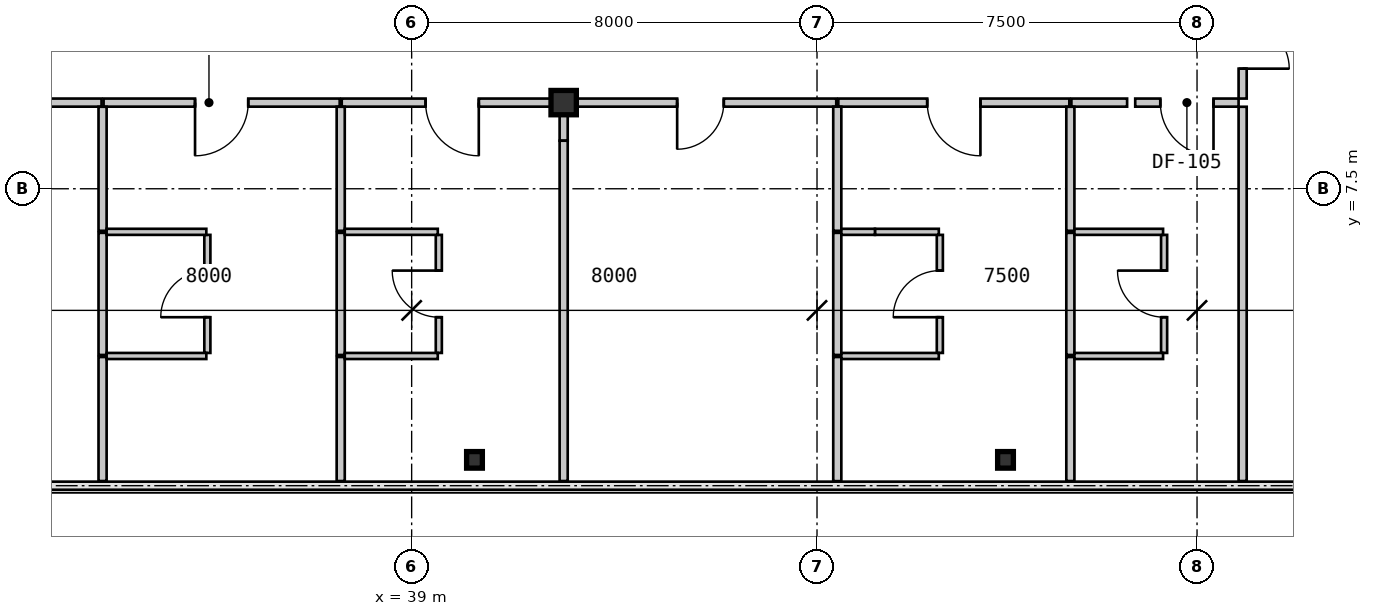
"""IFC4 building model, lengths in metres.
Left out: names, types, materials, properties, quantities, classifications, styles, units other than length and angle.
Written with IfcOpenShell. Run it as: python <this file> out.ifc"""

import sys

from ifc_helpers import new_model, si_unit, direction, frame, frame_2d, origin, origin_2d, place, context, subcontext, project, spatial, rectangle, i_section, extrude, source, transform, mapped, element, fill, save


model = new_model("IFC4")
c1 = context("Model", 3, precision=1e-05, world=origin(), true_north=direction((0.0, 1.0)))
c2 = subcontext(c1, "Body", "Model", "MODEL_VIEW")
j1 = project(units=[si_unit("LENGTHUNIT", "METRE"), si_unit("PLANEANGLEUNIT", "RADIAN")], contexts=[c1])
p1 = place(None, origin())
s1 = spatial("IfcSite", under=j1, at=p1, CompositionType="ELEMENT")
p2 = place(p1, origin())
s2 = spatial("IfcBuilding", under=s1, at=p2, CompositionType="ELEMENT")
p3 = place(p2, frame((0.0, 0.0, 19.95)))
s3 = spatial("IfcBuildingStorey", under=s2, at=p3, CompositionType="ELEMENT", Elevation=19.95)
m1 = source(origin(), c2, "Body", "SweptSolid", [
    extrude(i_section(OverallWidth=0.5, OverallDepth=0.48, WebThickness=0.028, FlangeThickness=0.044, at=origin_2d()), origin(), (0.0, 0.0, 1.0), 3.15),
])
p4 = place(p3, frame((42.0, 9.2, 0.0), z_axis=(0.0, 0.0, 1.0), x_axis=(1.0, 0.0, 0.0)))
e1 = element("IfcColumn", 1, at=p4, inside=s3, PredefinedType="COLUMN", context=c2, shape_type="MappedRepresentation", body=[
    mapped(m1, transform((0.0, 0.0, 0.0), scale=1.0)),
])
m2 = source(origin(), c2, "Body", "SweptSolid", [
    extrude(i_section(OverallWidth=0.311, OverallDepth=0.327, WebThickness=0.016, FlangeThickness=0.025, at=origin_2d()), origin(), (0.0, 0.0, 1.0), 3.15),
])
for number, where, z_axis, x_axis in (
    (2, (40.24, 2.15, 0.0), (0.0, 0.0, 1.0), (1.0, 0.0, 0.0)),
    (3, (50.72, 2.15, 0.0), (0.0, 0.0, 1.0), (1.0, 0.0, 0.0)),
):
    element("IfcColumn", number, at=place(p3, frame(where, z_axis=z_axis, x_axis=x_axis)), inside=s3, PredefinedType="COLUMN", context=c2, shape_type="MappedRepresentation", body=[
        mapped(m2, transform((0.0, 0.0, 0.0), scale=1.0)),
    ])
m3 = source(origin(), c2, "Body", "SweptSolid", [
    extrude(rectangle(XDim=2.04, YDim=0.16, at=frame_2d((1.02, 0.0))), origin(), (0.0, 0.0, 1.0), 2.93),
])
p5 = place(p3, frame((55.32, 9.2, 0.0), z_axis=(0.0, 0.0, 1.0), x_axis=(-1.0, 0.0, 0.0)))
e4 = element("IfcWall", 4, at=p5, inside=s3, PredefinedType="PARTITIONING", context=c2, shape_type="MappedRepresentation", body=[
    mapped(m3, transform((0.0, 0.0, 0.0), scale=1.0)),
])
m4 = source(origin(), c2, "Body", "SweptSolid", [
    extrude(rectangle(XDim=1.05, YDim=2.1, at=frame_2d((0.525, 1.05))), frame((0.0, 0.09, 0.0), z_axis=(0.0, -1.0, 0.0), x_axis=(1.0, 0.0, 0.0)), (0.0, 0.0, 1.0), 0.18),
])
p6 = place(p5, frame((0.495, 0.0, 0.0)))
e5 = element("IfcOpeningElement", 5, at=p6, cuts=e4, PredefinedType="OPENING", context=c2, shape_type="MappedRepresentation", body=[
    mapped(m4, transform((0.0, 0.0, 0.0), scale=1.0)),
])
m5 = source(origin(), c2, "Body", "SweptSolid", [
    extrude(rectangle(XDim=2.1, YDim=0.16, at=frame_2d((1.05, 0.0))), origin(), (0.0, 0.0, 1.0), 2.93),
])
p7 = place(p3, frame((55.4, 11.38, 0.0), z_axis=(0.0, 0.0, 1.0), x_axis=(0.0, -1.0, 0.0)))
e6 = element("IfcWall", 6, at=p7, inside=s3, PredefinedType="PARTITIONING", context=c2, shape_type="MappedRepresentation", body=[
    mapped(m5, transform((0.0, 0.0, 0.0), scale=1.0)),
])
m6 = source(origin(), c2, "Body", "SweptSolid", [
    extrude(rectangle(XDim=0.92, YDim=2.1, at=frame_2d((0.46, 1.05))), frame((0.0, 0.09, 0.0), z_axis=(0.0, -1.0, 0.0), x_axis=(1.0, 0.0, 0.0)), (0.0, 0.0, 1.0), 0.18),
])
p8 = place(p7, frame((0.59, 0.0, 0.0)))
e7 = element("IfcOpeningElement", 7, at=p8, cuts=e6, PredefinedType="OPENING", context=c2, shape_type="MappedRepresentation", body=[
    mapped(m6, transform((0.0, 0.0, 0.0), scale=1.0)),
])
m7 = source(origin(), c2, "Body", "SweptSolid", [
    extrude(rectangle(XDim=4.859, YDim=0.16, at=frame_2d((2.43, 0.0))), origin(), (0.0, 0.0, 1.0), 2.328),
])
p9 = place(p3, frame((32.88, 9.2, 0.0), z_axis=(0.0, 0.0, 1.0), x_axis=(-1.0, 0.0, 0.0)))
e8 = element("IfcWall", 8, at=p9, inside=s3, PredefinedType="PARTITIONING", context=c2, shape_type="MappedRepresentation", body=[
    mapped(m7, transform((0.0, 0.0, 0.0), scale=1.0)),
])
p10 = place(p9, frame((1.905, 0.0, 0.0)))
e9 = element("IfcOpeningElement", 9, at=p10, cuts=e8, PredefinedType="OPENING", context=c2, shape_type="MappedRepresentation", body=[
    mapped(m4, transform((0.0, 0.0, 0.0), scale=1.0)),
])
m8 = source(origin(), c2, "Body", "SweptSolid", [
    extrude(rectangle(XDim=4.659, YDim=0.16, at=frame_2d((2.33, 0.0))), origin(), (0.0, 0.0, 1.0), 2.328),
])
p11 = place(p3, frame((37.58, 9.2, 0.0), z_axis=(0.0, 0.0, 1.0), x_axis=(-1.0, 0.0, 0.0)))
e10 = element("IfcWall", 10, at=p11, inside=s3, PredefinedType="PARTITIONING", context=c2, shape_type="MappedRepresentation", body=[
    mapped(m8, transform((0.0, 0.0, 0.0), scale=1.0)),
])
p12 = place(p11, frame((1.805, 0.0, 0.0)))
e11 = element("IfcOpeningElement", 11, at=p12, cuts=e10, PredefinedType="OPENING", context=c2, shape_type="MappedRepresentation", body=[
    mapped(m4, transform((0.0, 0.0, 0.0), scale=1.0)),
])
m9 = source(origin(), c2, "Body", "SweptSolid", [
    extrude(rectangle(XDim=4.359, YDim=0.16, at=frame_2d((2.18, 0.0))), origin(), (0.0, 0.0, 1.0), 2.328),
])
p13 = place(p3, frame((41.98, 9.2, 0.0), z_axis=(0.0, 0.0, 1.0), x_axis=(-1.0, 0.0, 0.0)))
e12 = element("IfcWall", 12, at=p13, inside=s3, PredefinedType="PARTITIONING", context=c2, shape_type="MappedRepresentation", body=[
    mapped(m9, transform((0.0, 0.0, 0.0), scale=1.0)),
])
p14 = place(p13, frame((1.655, 0.0, 0.0)))
e13 = element("IfcOpeningElement", 13, at=p14, cuts=e12, PredefinedType="OPENING", context=c2, shape_type="MappedRepresentation", body=[
    mapped(m4, transform((0.0, 0.0, 0.0), scale=1.0)),
])
m10 = source(origin(), c2, "Body", "SweptSolid", [
    extrude(rectangle(XDim=5.36, YDim=0.16, at=frame_2d((2.68, 0.0))), origin(), (0.0, 0.0, 1.0), 2.93),
])
p15 = place(p3, frame((47.38, 9.2, 0.0), z_axis=(0.0, 0.0, 1.0), x_axis=(-1.0, 0.0, 0.0)))
e14 = element("IfcWall", 14, at=p15, inside=s3, PredefinedType="PARTITIONING", context=c2, shape_type="MappedRepresentation", body=[
    mapped(m10, transform((0.0, 0.0, 0.0), scale=1.0)),
])
p16 = place(p15, frame((2.22, 0.0, 0.0)))
e15 = element("IfcOpeningElement", 15, at=p16, cuts=e14, PredefinedType="OPENING", context=c2, shape_type="MappedRepresentation", body=[
    mapped(m6, transform((0.0, 0.0, 0.0), scale=1.0)),
])
m11 = source(origin(), c2, "Body", "SweptSolid", [
    extrude(rectangle(XDim=4.559, YDim=0.16, at=frame_2d((2.28, 0.0))), origin(), (0.0, 0.0, 1.0), 2.93),
])
p17 = place(p3, frame((51.98, 9.2, 0.0), z_axis=(0.0, 0.0, 1.0), x_axis=(-1.0, 0.0, 0.0)))
e16 = element("IfcWall", 16, at=p17, inside=s3, PredefinedType="PARTITIONING", context=c2, shape_type="MappedRepresentation", body=[
    mapped(m11, transform((0.0, 0.0, 0.0), scale=1.0)),
])
p18 = place(p17, frame((1.755, 0.0, 0.0)))
e17 = element("IfcOpeningElement", 17, at=p18, cuts=e16, PredefinedType="OPENING", context=c2, shape_type="MappedRepresentation", body=[
    mapped(m4, transform((0.0, 0.0, 0.0), scale=1.0)),
])
m12 = source(origin(), c2, "Body", "SweptSolid", [
    extrude(rectangle(XDim=1.1, YDim=0.16, at=frame_2d((0.55, 0.0))), origin(), (0.0, 0.0, 1.0), 2.93),
])
p19 = place(p3, frame((53.12, 9.2, 0.0), z_axis=(0.0, 0.0, 1.0), x_axis=(-1.0, 0.0, 0.0)))
e18 = element("IfcWall", 18, at=p19, inside=s3, PredefinedType="PARTITIONING", context=c2, shape_type="MappedRepresentation", body=[
    mapped(m12, transform((0.0, 0.0, 0.0), scale=1.0)),
])
m13 = source(origin(), c2, "Body", "SweptSolid", [
    extrude(rectangle(XDim=2.448, YDim=0.16, at=frame_2d((1.224, 0.0))), origin(), (0.0, 0.0, 1.0), 2.93),
])
for number, where, z_axis, x_axis in (
    (19, (32.9, 4.18, 0.0), (0.0, 0.0, 1.0), (0.0, -1.0, 0.0)),
    (20, (32.9, 9.118, 0.0), (0.0, 0.0, 1.0), (0.0, -1.0, 0.0)),
):
    element("IfcWall", number, at=place(p3, frame(where, z_axis=z_axis, x_axis=x_axis)), inside=s3, PredefinedType="PARTITIONING", context=c2, shape_type="MappedRepresentation", body=[
        mapped(m13, transform((0.0, 0.0, 0.0), scale=1.0)),
    ])
m14 = source(origin(), c2, "Body", "SweptSolid", [
    extrude(rectangle(XDim=2.41, YDim=0.16, at=frame_2d((1.205, 0.0))), origin(), (0.0, 0.0, 1.0), 2.93),
])
p20 = place(p3, frame((32.9, 6.63, 0.0), z_axis=(0.0, 0.0, 1.0), x_axis=(0.0, -1.0, 0.0)))
e21 = element("IfcWall", 21, at=p20, inside=s3, PredefinedType="PARTITIONING", context=c2, shape_type="MappedRepresentation", body=[
    mapped(m14, transform((0.0, 0.0, 0.0), scale=1.0)),
])
m15 = source(origin(), c2, "Body", "SweptSolid", [
    extrude(rectangle(XDim=2.33, YDim=0.12, at=frame_2d((1.165, 0.0))), origin(), (0.0, 0.0, 1.0), 2.93),
])
p21 = place(p3, frame((34.968, 4.26, 0.0), z_axis=(0.0, 0.0, 1.0), x_axis=(0.0, 1.0, 0.0)))
e22 = element("IfcWall", 22, at=p21, inside=s3, PredefinedType="PARTITIONING", context=c2, shape_type="MappedRepresentation", body=[
    mapped(m15, transform((0.0, 0.0, 0.0), scale=1.0)),
])
m16 = source(origin(), c2, "Body", "SweptSolid", [
    extrude(rectangle(XDim=0.92, YDim=2.1, at=frame_2d((0.46, 1.05))), frame((0.0, 0.07, 0.0), z_axis=(0.0, -1.0, 0.0), x_axis=(1.0, 0.0, 0.0)), (0.0, 0.0, 1.0), 0.14),
])
p22 = place(p21, frame((0.705, 0.0, 0.0)))
e23 = element("IfcOpeningElement", 23, at=p22, cuts=e22, PredefinedType="OPENING", context=c2, shape_type="MappedRepresentation", body=[
    mapped(m16, transform((0.0, 0.0, 0.0), scale=1.0)),
])
m17 = source(origin(), c2, "Body", "SweptSolid", [
    extrude(rectangle(XDim=1.968, YDim=0.12, at=frame_2d((0.984, 0.0))), origin(), (0.0, 0.0, 1.0), 2.93),
])
for number, where, z_axis, x_axis in (
    (24, (32.98, 4.2, 0.0), (0.0, 0.0, 1.0), (1.0, 0.0, 0.0)),
    (25, (34.948, 6.65, 0.0), (0.0, 0.0, 1.0), (-1.0, 0.0, 0.0)),
):
    element("IfcWall", number, at=place(p3, frame(where, z_axis=z_axis, x_axis=x_axis)), inside=s3, PredefinedType="PARTITIONING", context=c2, shape_type="MappedRepresentation", body=[
        mapped(m17, transform((0.0, 0.0, 0.0), scale=1.0)),
    ])
for number, where, z_axis, x_axis in (
    (26, (37.6, 4.18, 0.0), (0.0, 0.0, 1.0), (0.0, -1.0, 0.0)),
    (27, (37.6, 9.118, 0.0), (0.0, 0.0, 1.0), (0.0, -1.0, 0.0)),
):
    element("IfcWall", number, at=place(p3, frame(where, z_axis=z_axis, x_axis=x_axis)), inside=s3, PredefinedType="PARTITIONING", context=c2, shape_type="MappedRepresentation", body=[
        mapped(m13, transform((0.0, 0.0, 0.0), scale=1.0)),
    ])
p23 = place(p3, frame((37.6, 6.63, 0.0), z_axis=(0.0, 0.0, 1.0), x_axis=(0.0, -1.0, 0.0)))
e28 = element("IfcWall", 28, at=p23, inside=s3, PredefinedType="PARTITIONING", context=c2, shape_type="MappedRepresentation", body=[
    mapped(m14, transform((0.0, 0.0, 0.0), scale=1.0)),
])
p24 = place(p3, frame((39.536, 4.26, 0.0), z_axis=(0.0, 0.0, 1.0), x_axis=(0.0, 1.0, 0.0)))
e29 = element("IfcWall", 29, at=p24, inside=s3, PredefinedType="PARTITIONING", context=c2, shape_type="MappedRepresentation", body=[
    mapped(m15, transform((0.0, 0.0, 0.0), scale=1.0)),
])
p25 = place(p24, frame((0.705, 0.0, 0.0)))
e30 = element("IfcOpeningElement", 30, at=p25, cuts=e29, PredefinedType="OPENING", context=c2, shape_type="MappedRepresentation", body=[
    mapped(m16, transform((0.0, 0.0, 0.0), scale=1.0)),
])
m18 = source(origin(), c2, "Body", "SweptSolid", [
    extrude(rectangle(XDim=1.836, YDim=0.12, at=frame_2d((0.918, 0.0))), origin(), (0.0, 0.0, 1.0), 2.93),
])
for number, where, z_axis, x_axis in (
    (31, (37.68, 4.2, 0.0), (0.0, 0.0, 1.0), (1.0, 0.0, 0.0)),
    (32, (39.516, 6.65, 0.0), (0.0, 0.0, 1.0), (-1.0, 0.0, 0.0)),
):
    element("IfcWall", number, at=place(p3, frame(where, z_axis=z_axis, x_axis=x_axis)), inside=s3, PredefinedType="PARTITIONING", context=c2, shape_type="MappedRepresentation", body=[
        mapped(m18, transform((0.0, 0.0, 0.0), scale=1.0)),
    ])
m19 = source(origin(), c2, "Body", "SweptSolid", [
    extrude(rectangle(XDim=0.67, YDim=0.16, at=frame_2d((0.335, 0.0))), origin(), (0.0, 0.0, 1.0), 2.397),
])
p26 = place(p3, frame((42.0, 9.118, 0.0), z_axis=(0.0, 0.0, 1.0), x_axis=(0.0, -1.0, 0.0)))
e33 = element("IfcWall", 33, at=p26, inside=s3, PredefinedType="PARTITIONING", context=c2, shape_type="MappedRepresentation", body=[
    mapped(m19, transform((0.0, 0.0, 0.0), scale=1.0)),
])
m20 = source(origin(), c2, "Body", "SweptSolid", [
    extrude(rectangle(XDim=6.716, YDim=0.16, at=frame_2d((3.358, 0.0))), origin(), (0.0, 0.0, 1.0), 2.93),
])
p27 = place(p3, frame((42.0, 8.448, 0.0), z_axis=(0.0, 0.0, 1.0), x_axis=(0.0, -1.0, 0.0)))
e34 = element("IfcWall", 34, at=p27, inside=s3, PredefinedType="PARTITIONING", context=c2, shape_type="MappedRepresentation", body=[
    mapped(m20, transform((0.0, 0.0, 0.0), scale=1.0)),
])
m21 = source(origin(), c2, "Body", "SweptSolid", [
    extrude(rectangle(XDim=2.45, YDim=0.16, at=frame_2d((1.225, 0.0))), origin(), (0.0, 0.0, 1.0), 2.93),
])
p28 = place(p3, frame((47.4, 4.18, 0.0), z_axis=(0.0, 0.0, 1.0), x_axis=(0.0, -1.0, 0.0)))
e35 = element("IfcWall", 35, at=p28, inside=s3, PredefinedType="PARTITIONING", context=c2, shape_type="MappedRepresentation", body=[
    mapped(m21, transform((0.0, 0.0, 0.0), scale=1.0)),
])
m22 = source(origin(), c2, "Body", "SweptSolid", [
    extrude(rectangle(XDim=2.45, YDim=0.16, at=frame_2d((1.225, 0.0))), origin(), (0.0, 0.0, 1.0), 2.93),
])
p29 = place(p3, frame((47.4, 9.12, 0.0), z_axis=(0.0, 0.0, 1.0), x_axis=(0.0, -1.0, 0.0)))
e36 = element("IfcWall", 36, at=p29, inside=s3, PredefinedType="PARTITIONING", context=c2, shape_type="MappedRepresentation", body=[
    mapped(m22, transform((0.0, 0.0, 0.0), scale=1.0)),
])
p30 = place(p3, frame((47.4, 6.63, 0.0), z_axis=(0.0, 0.0, 1.0), x_axis=(0.0, -1.0, 0.0)))
e37 = element("IfcWall", 37, at=p30, inside=s3, PredefinedType="PARTITIONING", context=c2, shape_type="MappedRepresentation", body=[
    mapped(m14, transform((0.0, 0.0, 0.0), scale=1.0)),
])
p31 = place(p3, frame((49.424, 4.26, 0.0), z_axis=(0.0, 0.0, 1.0), x_axis=(0.0, 1.0, 0.0)))
e38 = element("IfcWall", 38, at=p31, inside=s3, PredefinedType="PARTITIONING", context=c2, shape_type="MappedRepresentation", body=[
    mapped(m15, transform((0.0, 0.0, 0.0), scale=1.0)),
])
p32 = place(p31, frame((0.705, 0.0, 0.0)))
e39 = element("IfcOpeningElement", 39, at=p32, cuts=e38, PredefinedType="OPENING", context=c2, shape_type="MappedRepresentation", body=[
    mapped(m16, transform((0.0, 0.0, 0.0), scale=1.0)),
])
m23 = source(origin(), c2, "Body", "SweptSolid", [
    extrude(rectangle(XDim=1.924, YDim=0.12, at=frame_2d((0.962, 0.0))), origin(), (0.0, 0.0, 1.0), 2.93),
])
p33 = place(p3, frame((47.48, 4.2, 0.0), z_axis=(0.0, 0.0, 1.0), x_axis=(1.0, 0.0, 0.0)))
e40 = element("IfcWall", 40, at=p33, inside=s3, PredefinedType="PARTITIONING", context=c2, shape_type="MappedRepresentation", body=[
    mapped(m23, transform((0.0, 0.0, 0.0), scale=1.0)),
])
m24 = source(origin(), c2, "Body", "SweptSolid", [
    extrude(rectangle(XDim=1.26, YDim=0.12, at=frame_2d((0.63, 0.0))), origin(), (0.0, 0.0, 1.0), 2.93),
])
p34 = place(p3, frame((49.404, 6.65, 0.0), z_axis=(0.0, 0.0, 1.0), x_axis=(-1.0, 0.0, 0.0)))
e41 = element("IfcWall", 41, at=p34, inside=s3, PredefinedType="PARTITIONING", context=c2, shape_type="MappedRepresentation", body=[
    mapped(m24, transform((0.0, 0.0, 0.0), scale=1.0)),
])
m25 = source(origin(), c2, "Body", "SweptSolid", [
    extrude(rectangle(XDim=0.664, YDim=0.12, at=frame_2d((0.332, 0.0))), origin(), (0.0, 0.0, 1.0), 2.47),
])
p35 = place(p3, frame((48.144, 6.65, 0.0), z_axis=(0.0, 0.0, 1.0), x_axis=(-1.0, 0.0, 0.0)))
e42 = element("IfcWall", 42, at=p35, inside=s3, PredefinedType="PARTITIONING", context=c2, shape_type="MappedRepresentation", body=[
    mapped(m25, transform((0.0, 0.0, 0.0), scale=1.0)),
])
for number, where, z_axis, x_axis in (
    (43, (52.0, 4.18, 0.0), (0.0, 0.0, 1.0), (0.0, -1.0, 0.0)),
    (44, (52.0, 9.118, 0.0), (0.0, 0.0, 1.0), (0.0, -1.0, 0.0)),
):
    element("IfcWall", number, at=place(p3, frame(where, z_axis=z_axis, x_axis=x_axis)), inside=s3, PredefinedType="PARTITIONING", context=c2, shape_type="MappedRepresentation", body=[
        mapped(m13, transform((0.0, 0.0, 0.0), scale=1.0)),
    ])
p36 = place(p3, frame((52.0, 6.63, 0.0), z_axis=(0.0, 0.0, 1.0), x_axis=(0.0, -1.0, 0.0)))
e45 = element("IfcWall", 45, at=p36, inside=s3, PredefinedType="PARTITIONING", context=c2, shape_type="MappedRepresentation", body=[
    mapped(m14, transform((0.0, 0.0, 0.0), scale=1.0)),
])
p37 = place(p3, frame((53.85, 4.26, 0.0), z_axis=(0.0, 0.0, 1.0), x_axis=(0.0, 1.0, 0.0)))
e46 = element("IfcWall", 46, at=p37, inside=s3, PredefinedType="PARTITIONING", context=c2, shape_type="MappedRepresentation", body=[
    mapped(m15, transform((0.0, 0.0, 0.0), scale=1.0)),
])
p38 = place(p37, frame((0.705, 0.0, 0.0)))
e47 = element("IfcOpeningElement", 47, at=p38, cuts=e46, PredefinedType="OPENING", context=c2, shape_type="MappedRepresentation", body=[
    mapped(m16, transform((0.0, 0.0, 0.0), scale=1.0)),
])
m26 = source(origin(), c2, "Body", "SweptSolid", [
    extrude(rectangle(XDim=1.75, YDim=0.12, at=frame_2d((0.875, 0.0))), origin(), (0.0, 0.0, 1.0), 2.93),
])
for number, where, z_axis, x_axis in (
    (48, (52.08, 4.2, 0.0), (0.0, 0.0, 1.0), (1.0, 0.0, 0.0)),
    (49, (53.83, 6.65, 0.0), (0.0, 0.0, 1.0), (-1.0, 0.0, 0.0)),
):
    element("IfcWall", number, at=place(p3, frame(where, z_axis=z_axis, x_axis=x_axis)), inside=s3, PredefinedType="PARTITIONING", context=c2, shape_type="MappedRepresentation", body=[
        mapped(m26, transform((0.0, 0.0, 0.0), scale=1.0)),
    ])
m27 = source(origin(), c2, "Body", "SweptSolid", [
    extrude(rectangle(XDim=7.386, YDim=0.16, at=frame_2d((3.693, 0.0))), origin(), (0.0, 0.0, 1.0), 2.93),
])
p39 = place(p3, frame((55.4, 9.118, 0.0), z_axis=(0.0, 0.0, 1.0), x_axis=(0.0, -1.0, 0.0)))
e50 = element("IfcWall", 50, at=p39, inside=s3, PredefinedType="PARTITIONING", context=c2, shape_type="MappedRepresentation", body=[
    mapped(m27, transform((0.0, 0.0, 0.0), scale=1.0)),
])
m28 = source(origin(), c2, "Body", "SweptSolid", [
    extrude(rectangle(XDim=1.05, YDim=2.1, at=frame_2d((0.525, 1.05))), frame((0.0, 0.025, 0.0), z_axis=(0.0, -1.0, 0.0), x_axis=(1.0, 0.0, 0.0)), (0.0, 0.0, 1.0), 0.05),
])
p40 = place(p6, origin())
e51 = element("IfcDoor", 51, at=p40, inside=s3, OperationType="SINGLE_SWING_LEFT", PredefinedType="DOOR", context=c2, shape_type="MappedRepresentation", body=[
    mapped(m28, transform((0.0, 0.0, 0.0), scale=1.0)),
])
fill(e5, e51)
m29 = source(origin(), c2, "Body", "SweptSolid", [
    extrude(rectangle(XDim=0.92, YDim=2.1, at=frame_2d((0.46, 1.05))), frame((0.0, 0.025, 0.0), z_axis=(0.0, -1.0, 0.0), x_axis=(1.0, 0.0, 0.0)), (0.0, 0.0, 1.0), 0.05),
])
p41 = place(p8, origin())
e52 = element("IfcDoor", 52, at=p41, inside=s3, OperationType="SINGLE_SWING_RIGHT", PredefinedType="DOOR", context=c2, shape_type="MappedRepresentation", body=[
    mapped(m29, transform((0.0, 0.0, 0.0), scale=1.0)),
])
fill(e7, e52)
p42 = place(p12, origin())
e53 = element("IfcDoor", 53, at=p42, inside=s3, OperationType="SINGLE_SWING_RIGHT", PredefinedType="DOOR", context=c2, shape_type="MappedRepresentation", body=[
    mapped(m28, transform((0.0, 0.0, 0.0), scale=1.0)),
])
fill(e11, e53)
p43 = place(p14, origin())
e54 = element("IfcDoor", 54, at=p43, inside=s3, OperationType="SINGLE_SWING_LEFT", PredefinedType="DOOR", context=c2, shape_type="MappedRepresentation", body=[
    mapped(m28, transform((0.0, 0.0, 0.0), scale=1.0)),
])
fill(e13, e54)
p44 = place(p16, origin())
e55 = element("IfcDoor", 55, at=p44, inside=s3, OperationType="SINGLE_SWING_RIGHT", PredefinedType="DOOR", context=c2, shape_type="MappedRepresentation", body=[
    mapped(m29, transform((0.0, 0.0, 0.0), scale=1.0)),
])
fill(e15, e55)
p45 = place(p18, origin())
e56 = element("IfcDoor", 56, at=p45, inside=s3, OperationType="SINGLE_SWING_LEFT", PredefinedType="DOOR", context=c2, shape_type="MappedRepresentation", body=[
    mapped(m28, transform((0.0, 0.0, 0.0), scale=1.0)),
])
fill(e17, e56)
p46 = place(p22, origin())
e57 = element("IfcDoor", 57, at=p46, inside=s3, OperationType="SINGLE_SWING_LEFT", PredefinedType="DOOR", context=c2, shape_type="MappedRepresentation", body=[
    mapped(m29, transform((0.0, 0.0, 0.0), scale=1.0)),
])
fill(e23, e57)
p47 = place(p25, origin())
e58 = element("IfcDoor", 58, at=p47, inside=s3, OperationType="SINGLE_SWING_RIGHT", PredefinedType="DOOR", context=c2, shape_type="MappedRepresentation", body=[
    mapped(m29, transform((0.0, 0.0, 0.0), scale=1.0)),
])
fill(e30, e58)
p48 = place(p32, origin())
e59 = element("IfcDoor", 59, at=p48, inside=s3, OperationType="SINGLE_SWING_LEFT", PredefinedType="DOOR", context=c2, shape_type="MappedRepresentation", body=[
    mapped(m29, transform((0.0, 0.0, 0.0), scale=1.0)),
])
fill(e39, e59)
p49 = place(p38, origin())
e60 = element("IfcDoor", 60, at=p49, inside=s3, OperationType="SINGLE_SWING_RIGHT", PredefinedType="DOOR", context=c2, shape_type="MappedRepresentation", body=[
    mapped(m29, transform((0.0, 0.0, 0.0), scale=1.0)),
])
fill(e47, e60)
save(model, sys.argv[1])
